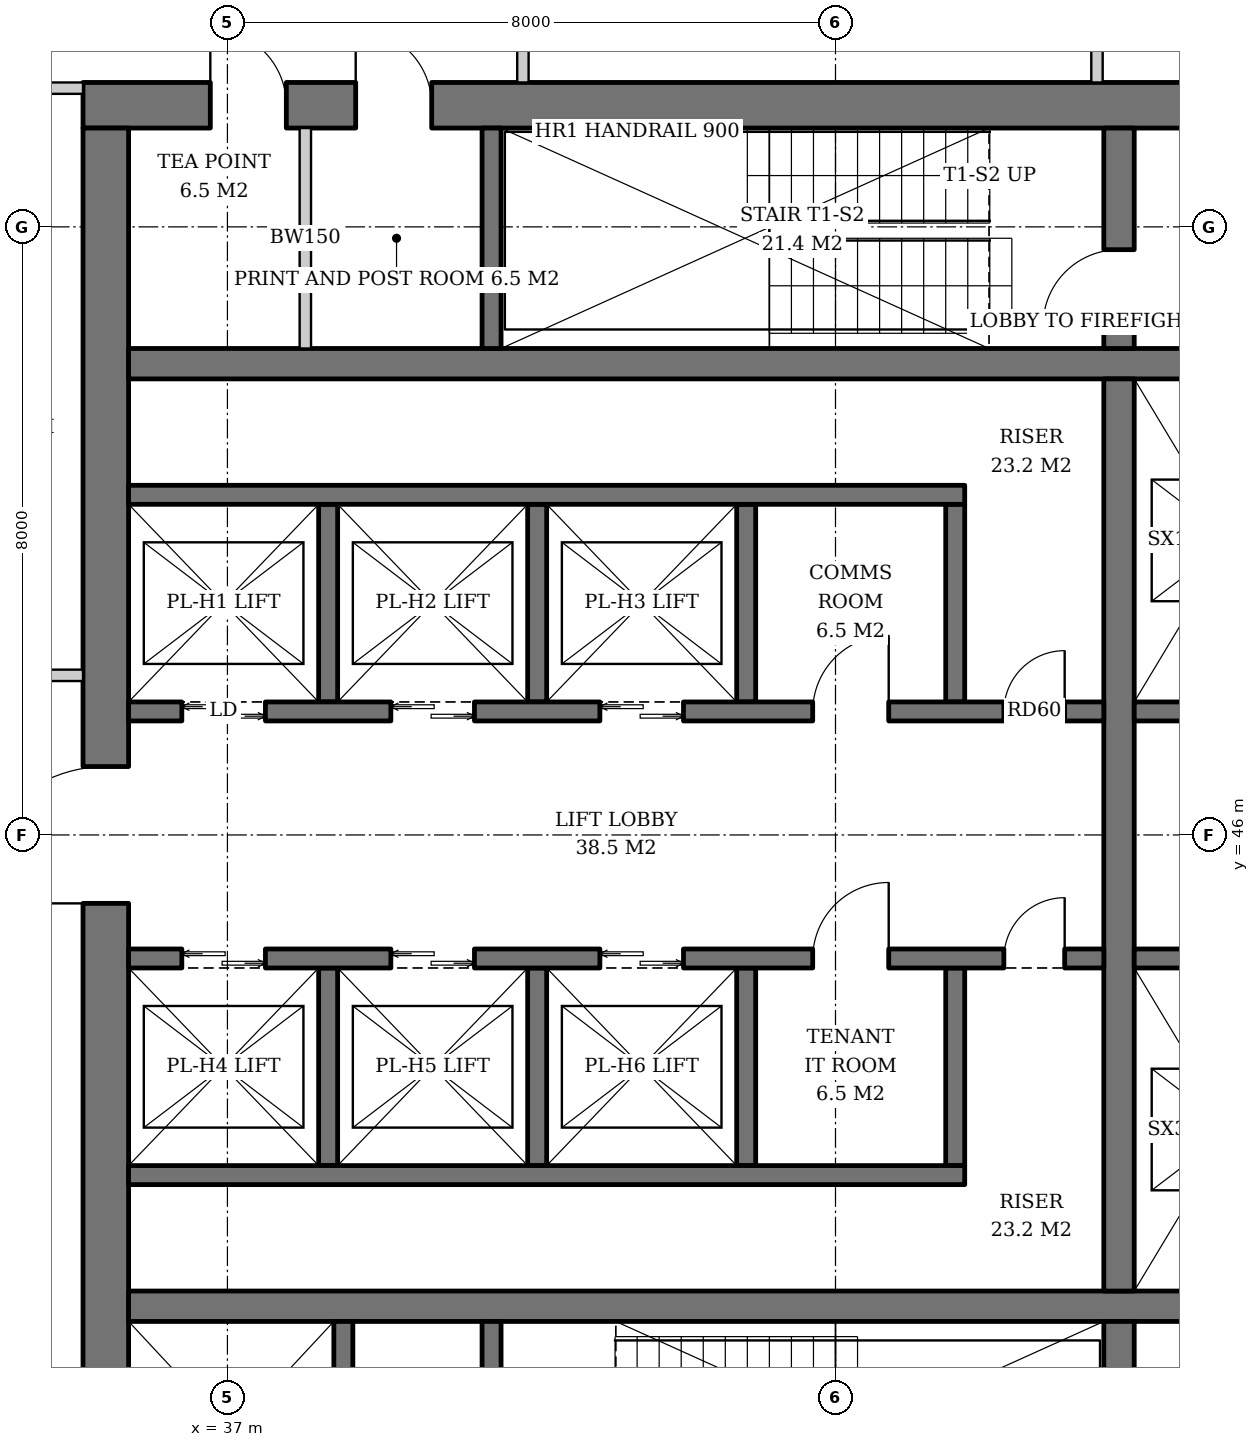
"""IFC4 building model, lengths in metres.
Left out: names, types, materials, properties, quantities, classifications, styles, units other than length and angle.
Written with IfcOpenShell. Run it as: python <this file> out.ifc"""

import sys

from ifc_helpers import new_model, si_unit, direction, frame, frame_2d, origin, place, context, subcontext, project, spatial, rectangle, extrude, element, fill, save


model = new_model("IFC4")
c1 = context("Model", 3, precision=1e-05, world=origin(), true_north=direction((0.0, 1.0)))
c2 = subcontext(c1, "Body", "Model", "MODEL_VIEW")
j1 = project(units=[si_unit("LENGTHUNIT", "METRE"), si_unit("PLANEANGLEUNIT", "RADIAN")], contexts=[c1])
p1 = place(None, origin())
s1 = spatial("IfcSite", under=j1, at=p1, CompositionType="ELEMENT")
p2 = place(p1, origin())
s2 = spatial("IfcBuilding", under=s1, at=p2, CompositionType="ELEMENT")
p3 = place(p2, frame((0.0, 0.0, 207.2)))
s3 = spatial("IfcBuildingStorey", under=s2, at=p3, CompositionType="ELEMENT", Elevation=207.2)
p4 = place(p3, frame((35.1, 55.6, 0.0), z_axis=(0.0, 0.0, 1.0), x_axis=(1.0, 0.0, 0.0)))
e1 = element("IfcWall", 1, at=p4, inside=s3, PredefinedType="SHEAR", context=c2, shape_type="SweptSolid", body=[
    extrude(rectangle(XDim=19.8, YDim=0.6, at=frame_2d((9.9, 0.0))), origin(), (0.0, 0.0, 1.0), 3.8),
])
p5 = place(p4, frame((14.54, 0.0, 0.0)))
e2 = element("IfcOpeningElement", 2, at=p5, cuts=e1, PredefinedType="OPENING", context=c2, shape_type="SweptSolid", body=[
    extrude(rectangle(XDim=1.0, YDim=2.1, at=frame_2d((0.5, 1.05))), frame((0.0, 0.31, 0.0), z_axis=(0.0, -1.0, 0.0), x_axis=(1.0, 0.0, 0.0)), (0.0, 0.0, 1.0), 0.62),
])
p6 = place(p4, frame((1.675, 0.0, 0.0)))
e3 = element("IfcOpeningElement", 3, at=p6, cuts=e1, PredefinedType="OPENING", context=c2, shape_type="SweptSolid", body=[
    extrude(rectangle(XDim=1.0, YDim=2.1, at=frame_2d((0.5, 1.05))), frame((0.0, 0.31, 0.0), z_axis=(0.0, -1.0, 0.0), x_axis=(1.0, 0.0, 0.0)), (0.0, 0.0, 1.0), 0.62),
])
p7 = place(p4, frame((3.587, 0.0, 0.0)))
e4 = element("IfcOpeningElement", 4, at=p7, cuts=e1, PredefinedType="OPENING", context=c2, shape_type="SweptSolid", body=[
    extrude(rectangle(XDim=1.0, YDim=2.1, at=frame_2d((0.5, 1.05))), frame((0.0, 0.31, 0.0), z_axis=(0.0, -1.0, 0.0), x_axis=(1.0, 0.0, 0.0)), (0.0, 0.0, 1.0), 0.62),
])
p8 = place(p3, frame((35.4, 36.7, 0.0), z_axis=(0.0, 0.0, 1.0), x_axis=(0.0, 1.0, 0.0)))
e5 = element("IfcWall", 5, at=p8, inside=s3, PredefinedType="SHEAR", context=c2, shape_type="SweptSolid", body=[
    extrude(rectangle(XDim=18.6, YDim=0.6, at=frame_2d((9.3, 0.0))), origin(), (0.0, 0.0, 1.0), 3.8),
])
p9 = place(p8, frame((8.4, 0.0, 0.0)))
e6 = element("IfcOpeningElement", 6, at=p9, cuts=e5, PredefinedType="OPENING", context=c2, shape_type="SweptSolid", body=[
    extrude(rectangle(XDim=1.8, YDim=2.4, at=frame_2d((0.9, 1.2))), frame((0.0, 0.31, 0.0), z_axis=(0.0, -1.0, 0.0), x_axis=(1.0, 0.0, 0.0)), (0.0, 0.0, 1.0), 0.62),
])
for number, where, z_axis, x_axis in (
    (7, (35.7, 39.8, 0.0), (0.0, 0.0, 1.0), (1.0, 0.0, 0.0)),
    (8, (35.7, 52.2, 0.0), (0.0, 0.0, 1.0), (1.0, 0.0, 0.0)),
):
    element("IfcWall", number, at=place(p3, frame(where, z_axis=z_axis, x_axis=x_axis)), inside=s3, PredefinedType="SHEAR", context=c2, shape_type="SweptSolid", body=[
        extrude(rectangle(XDim=18.6, YDim=0.4, at=frame_2d((9.3, 0.0))), origin(), (0.0, 0.0, 1.0), 3.8),
    ])
p10 = place(p3, frame((48.73, 36.7, 0.0), z_axis=(0.0, 0.0, 1.0), x_axis=(0.0, 1.0, 0.0)))
e9 = element("IfcWall", 9, at=p10, inside=s3, PredefinedType="SHEAR", context=c2, shape_type="SweptSolid", body=[
    extrude(rectangle(XDim=2.9, YDim=0.4, at=frame_2d((1.45, 0.0))), origin(), (0.0, 0.0, 1.0), 3.8),
])
p11 = place(p3, frame((48.73, 40.0, 0.0), z_axis=(0.0, 0.0, 1.0), x_axis=(0.0, 1.0, 0.0)))
e10 = element("IfcWall", 10, at=p11, inside=s3, PredefinedType="SHEAR", context=c2, shape_type="SweptSolid", body=[
    extrude(rectangle(XDim=12.0, YDim=0.4, at=frame_2d((6.0, 0.0))), origin(), (0.0, 0.0, 1.0), 3.8),
])
p12 = place(p3, frame((48.73, 52.4, 0.0), z_axis=(0.0, 0.0, 1.0), x_axis=(0.0, 1.0, 0.0)))
e11 = element("IfcWall", 11, at=p12, inside=s3, PredefinedType="SHEAR", context=c2, shape_type="SweptSolid", body=[
    extrude(rectangle(XDim=2.9, YDim=0.4, at=frame_2d((1.45, 0.0))), origin(), (0.0, 0.0, 1.0), 3.8),
])
p13 = place(p12, frame((0.3, 0.0, 0.0)))
e12 = element("IfcOpeningElement", 12, at=p13, cuts=e11, PredefinedType="OPENING", context=c2, shape_type="SweptSolid", body=[
    extrude(rectangle(XDim=1.0, YDim=2.1, at=frame_2d((0.5, 1.05))), frame((0.0, 0.21, 0.0), z_axis=(0.0, -1.0, 0.0), x_axis=(1.0, 0.0, 0.0)), (0.0, 0.0, 1.0), 0.42),
])
p14 = place(p3, frame((38.525, 36.7, 0.0), z_axis=(0.0, 0.0, 1.0), x_axis=(0.0, 1.0, 0.0)))
e13 = element("IfcWall", 13, at=p14, inside=s3, PredefinedType="SHEAR", context=c2, shape_type="SweptSolid", body=[
    extrude(rectangle(XDim=2.9, YDim=0.25, at=frame_2d((1.45, 0.0))), origin(), (0.0, 0.0, 1.0), 3.8),
])
p15 = place(p14, frame((0.8, 0.0, 0.0)))
e14 = element("IfcOpeningElement", 14, at=p15, cuts=e13, PredefinedType="OPENING", context=c2, shape_type="SweptSolid", body=[
    extrude(rectangle(XDim=1.3, YDim=2.2, at=frame_2d((0.65, 1.1))), frame((0.0, 0.135, 0.0), z_axis=(0.0, -1.0, 0.0), x_axis=(1.0, 0.0, 0.0)), (0.0, 0.0, 1.0), 0.27),
])
p16 = place(p3, frame((40.475, 36.7, 0.0), z_axis=(0.0, 0.0, 1.0), x_axis=(0.0, 1.0, 0.0)))
e15 = element("IfcWall", 15, at=p16, inside=s3, PredefinedType="SHEAR", context=c2, shape_type="SweptSolid", body=[
    extrude(rectangle(XDim=2.9, YDim=0.25, at=frame_2d((1.45, 0.0))), origin(), (0.0, 0.0, 1.0), 3.8),
])
p17 = place(p16, frame((0.75, 0.0, 0.0)))
e16 = element("IfcOpeningElement", 16, at=p17, cuts=e15, PredefinedType="OPENING", context=c2, shape_type="SweptSolid", body=[
    extrude(rectangle(XDim=1.2, YDim=2.1, at=frame_2d((0.6, 1.05))), frame((0.0, 0.135, 0.0), z_axis=(0.0, -1.0, 0.0), x_axis=(1.0, 0.0, 0.0)), (0.0, 0.0, 1.0), 0.27),
])
p18 = place(p3, frame((40.475, 52.4, 0.0), z_axis=(0.0, 0.0, 1.0), x_axis=(0.0, 1.0, 0.0)))
e17 = element("IfcWall", 17, at=p18, inside=s3, PredefinedType="SHEAR", context=c2, shape_type="SweptSolid", body=[
    extrude(rectangle(XDim=2.9, YDim=0.25, at=frame_2d((1.45, 0.0))), origin(), (0.0, 0.0, 1.0), 3.8),
])
for number, where, z_axis, x_axis in (
    (18, (38.325, 47.75, 0.0), (0.0, 0.0, 1.0), (0.0, 1.0, 0.0)),
    (19, (41.075, 47.75, 0.0), (0.0, 0.0, 1.0), (0.0, 1.0, 0.0)),
    (20, (43.825, 47.75, 0.0), (0.0, 0.0, 1.0), (0.0, 1.0, 0.0)),
    (21, (46.575, 47.75, 0.0), (0.0, 0.0, 1.0), (0.0, 1.0, 0.0)),
):
    element("IfcWall", number, at=place(p3, frame(where, z_axis=z_axis, x_axis=x_axis)), inside=s3, PredefinedType="SHEAR", context=c2, shape_type="SweptSolid", body=[
        extrude(rectangle(XDim=2.6, YDim=0.25, at=frame_2d((1.3, 0.0))), origin(), (0.0, 0.0, 1.0), 3.8),
    ])
p19 = place(p3, frame((35.7, 50.475, 0.0), z_axis=(0.0, 0.0, 1.0), x_axis=(1.0, 0.0, 0.0)))
e22 = element("IfcWall", 22, at=p19, inside=s3, PredefinedType="SHEAR", context=c2, shape_type="SweptSolid", body=[
    extrude(rectangle(XDim=11.0, YDim=0.25, at=frame_2d((5.5, 0.0))), origin(), (0.0, 0.0, 1.0), 3.8),
])
p20 = place(p3, frame((35.7, 47.625, 0.0), z_axis=(0.0, 0.0, 1.0), x_axis=(1.0, 0.0, 0.0)))
e23 = element("IfcWall", 23, at=p20, inside=s3, PredefinedType="SHEAR", context=c2, shape_type="SweptSolid", body=[
    extrude(rectangle(XDim=12.83, YDim=0.25, at=frame_2d((6.415, 0.0))), origin(), (0.0, 0.0, 1.0), 3.8),
])
p21 = place(p20, frame((0.7, 0.0, 0.0)))
e24 = element("IfcOpeningElement", 24, at=p21, cuts=e23, PredefinedType="OPENING", context=c2, shape_type="SweptSolid", body=[
    extrude(rectangle(XDim=1.1, YDim=2.2, at=frame_2d((0.55, 1.1))), frame((0.0, 0.135, 0.0), z_axis=(0.0, -1.0, 0.0), x_axis=(1.0, 0.0, 0.0)), (0.0, 0.0, 1.0), 0.27),
])
p22 = place(p20, frame((3.45, 0.0, 0.0)))
e25 = element("IfcOpeningElement", 25, at=p22, cuts=e23, PredefinedType="OPENING", context=c2, shape_type="SweptSolid", body=[
    extrude(rectangle(XDim=1.1, YDim=2.2, at=frame_2d((0.55, 1.1))), frame((0.0, 0.135, 0.0), z_axis=(0.0, -1.0, 0.0), x_axis=(1.0, 0.0, 0.0)), (0.0, 0.0, 1.0), 0.27),
])
p23 = place(p20, frame((6.2, 0.0, 0.0)))
e26 = element("IfcOpeningElement", 26, at=p23, cuts=e23, PredefinedType="OPENING", context=c2, shape_type="SweptSolid", body=[
    extrude(rectangle(XDim=1.1, YDim=2.2, at=frame_2d((0.55, 1.1))), frame((0.0, 0.135, 0.0), z_axis=(0.0, -1.0, 0.0), x_axis=(1.0, 0.0, 0.0)), (0.0, 0.0, 1.0), 0.27),
])
p24 = place(p20, frame((9.0, 0.0, 0.0)))
e27 = element("IfcOpeningElement", 27, at=p24, cuts=e23, PredefinedType="OPENING", context=c2, shape_type="SweptSolid", body=[
    extrude(rectangle(XDim=1.0, YDim=2.1, at=frame_2d((0.5, 1.05))), frame((0.0, 0.135, 0.0), z_axis=(0.0, -1.0, 0.0), x_axis=(1.0, 0.0, 0.0)), (0.0, 0.0, 1.0), 0.27),
])
p25 = place(p20, frame((11.515, 0.0, 0.0)))
e28 = element("IfcOpeningElement", 28, at=p25, cuts=e23, PredefinedType="OPENING", context=c2, shape_type="SweptSolid", body=[
    extrude(rectangle(XDim=0.8, YDim=2.0, at=frame_2d((0.4, 1.0))), frame((0.0, 0.135, 0.0), z_axis=(0.0, -1.0, 0.0), x_axis=(1.0, 0.0, 0.0)), (0.0, 0.0, 1.0), 0.27),
])
for number, where, z_axis, x_axis in (
    (29, (38.325, 44.25, 0.0), (0.0, 0.0, 1.0), (0.0, -1.0, 0.0)),
    (30, (41.075, 44.25, 0.0), (0.0, 0.0, 1.0), (0.0, -1.0, 0.0)),
    (31, (43.825, 44.25, 0.0), (0.0, 0.0, 1.0), (0.0, -1.0, 0.0)),
    (32, (46.575, 44.25, 0.0), (0.0, 0.0, 1.0), (0.0, -1.0, 0.0)),
):
    element("IfcWall", number, at=place(p3, frame(where, z_axis=z_axis, x_axis=x_axis)), inside=s3, PredefinedType="SHEAR", context=c2, shape_type="SweptSolid", body=[
        extrude(rectangle(XDim=2.6, YDim=0.25, at=frame_2d((1.3, 0.0))), origin(), (0.0, 0.0, 1.0), 3.8),
    ])
p26 = place(p3, frame((35.7, 41.525, 0.0), z_axis=(0.0, 0.0, 1.0), x_axis=(1.0, 0.0, 0.0)))
e33 = element("IfcWall", 33, at=p26, inside=s3, PredefinedType="SHEAR", context=c2, shape_type="SweptSolid", body=[
    extrude(rectangle(XDim=11.0, YDim=0.25, at=frame_2d((5.5, 0.0))), origin(), (0.0, 0.0, 1.0), 3.8),
])
p27 = place(p3, frame((35.7, 44.375, 0.0), z_axis=(0.0, 0.0, 1.0), x_axis=(1.0, 0.0, 0.0)))
e34 = element("IfcWall", 34, at=p27, inside=s3, PredefinedType="SHEAR", context=c2, shape_type="SweptSolid", body=[
    extrude(rectangle(XDim=12.83, YDim=0.25, at=frame_2d((6.415, 0.0))), origin(), (0.0, 0.0, 1.0), 3.8),
])
p28 = place(p27, frame((0.7, 0.0, 0.0)))
e35 = element("IfcOpeningElement", 35, at=p28, cuts=e34, PredefinedType="OPENING", context=c2, shape_type="SweptSolid", body=[
    extrude(rectangle(XDim=1.1, YDim=2.2, at=frame_2d((0.55, 1.1))), frame((0.0, 0.135, 0.0), z_axis=(0.0, -1.0, 0.0), x_axis=(1.0, 0.0, 0.0)), (0.0, 0.0, 1.0), 0.27),
])
p29 = place(p27, frame((3.45, 0.0, 0.0)))
e36 = element("IfcOpeningElement", 36, at=p29, cuts=e34, PredefinedType="OPENING", context=c2, shape_type="SweptSolid", body=[
    extrude(rectangle(XDim=1.1, YDim=2.2, at=frame_2d((0.55, 1.1))), frame((0.0, 0.135, 0.0), z_axis=(0.0, -1.0, 0.0), x_axis=(1.0, 0.0, 0.0)), (0.0, 0.0, 1.0), 0.27),
])
p30 = place(p27, frame((6.2, 0.0, 0.0)))
e37 = element("IfcOpeningElement", 37, at=p30, cuts=e34, PredefinedType="OPENING", context=c2, shape_type="SweptSolid", body=[
    extrude(rectangle(XDim=1.1, YDim=2.2, at=frame_2d((0.55, 1.1))), frame((0.0, 0.135, 0.0), z_axis=(0.0, -1.0, 0.0), x_axis=(1.0, 0.0, 0.0)), (0.0, 0.0, 1.0), 0.27),
])
p31 = place(p27, frame((9.0, 0.0, 0.0)))
e38 = element("IfcOpeningElement", 38, at=p31, cuts=e34, PredefinedType="OPENING", context=c2, shape_type="SweptSolid", body=[
    extrude(rectangle(XDim=1.0, YDim=2.1, at=frame_2d((0.5, 1.05))), frame((0.0, 0.135, 0.0), z_axis=(0.0, -1.0, 0.0), x_axis=(1.0, 0.0, 0.0)), (0.0, 0.0, 1.0), 0.27),
])
p32 = place(p27, frame((11.515, 0.0, 0.0)))
e39 = element("IfcOpeningElement", 39, at=p32, cuts=e34, PredefinedType="OPENING", context=c2, shape_type="SweptSolid", body=[
    extrude(rectangle(XDim=0.8, YDim=2.0, at=frame_2d((0.4, 1.0))), frame((0.0, 0.135, 0.0), z_axis=(0.0, -1.0, 0.0), x_axis=(1.0, 0.0, 0.0)), (0.0, 0.0, 1.0), 0.27),
])
for number, where, z_axis, x_axis in (
    (40, (48.93, 47.625, 0.0), (0.0, 0.0, 1.0), (1.0, 0.0, 0.0)),
    (41, (48.93, 44.375, 0.0), (0.0, 0.0, 1.0), (1.0, 0.0, 0.0)),
):
    element("IfcWall", number, at=place(p3, frame(where, z_axis=z_axis, x_axis=x_axis)), inside=s3, PredefinedType="SHEAR", context=c2, shape_type="SweptSolid", body=[
        extrude(rectangle(XDim=5.37, YDim=0.25, at=frame_2d((2.685, 0.0))), origin(), (0.0, 0.0, 1.0), 3.8),
    ])
p33 = place(p3, frame((38.025, 52.4, 0.0), z_axis=(0.0, 0.0, 1.0), x_axis=(0.0, 1.0, 0.0)))
e42 = element("IfcWall", 42, at=p33, inside=s3, PredefinedType="SOLIDWALL", context=c2, shape_type="SweptSolid", body=[
    extrude(rectangle(XDim=2.9, YDim=0.15, at=frame_2d((1.45, 0.0))), origin(), (0.0, 0.0, 1.0), 3.62),
])
for number, where, z_axis, x_axis in (
    (43, (48.44, 55.9, 0.0), (0.0, 0.0, 1.0), (0.0, 1.0, 0.0)),
    (44, (40.887, 55.9, 0.0), (0.0, 0.0, 1.0), (0.0, 1.0, 0.0)),
):
    element("IfcWall", number, at=place(p3, frame(where, z_axis=z_axis, x_axis=x_axis)), inside=s3, PredefinedType="PARTITIONING", context=c2, shape_type="SweptSolid", body=[
        extrude(rectangle(XDim=2.925, YDim=0.15, at=frame_2d((1.462, 0.0))), origin(), (0.0, 0.0, 1.0), 3.62),
    ])
p34 = place(p3, frame((35.1, 55.825, 0.0), z_axis=(0.0, 0.0, 1.0), x_axis=(-1.0, 0.0, 0.0)))
e45 = element("IfcWall", 45, at=p34, inside=s3, PredefinedType="PARTITIONING", context=c2, shape_type="SweptSolid", body=[
    extrude(rectangle(XDim=2.925, YDim=0.15, at=frame_2d((1.462, 0.0))), origin(), (0.0, 0.0, 1.0), 2.867),
])
p35 = place(p3, frame((35.1, 48.1, 0.0), z_axis=(0.0, 0.0, 1.0), x_axis=(-1.0, 0.0, 0.0)))
e46 = element("IfcWall", 46, at=p35, inside=s3, PredefinedType="PARTITIONING", context=c2, shape_type="SweptSolid", body=[
    extrude(rectangle(XDim=2.925, YDim=0.15, at=frame_2d((1.462, 0.0))), origin(), (0.0, 0.0, 1.0), 3.62),
])
p36 = place(p21, origin())
e47 = element("IfcDoor", 47, at=p36, inside=s3, OperationType="DOUBLE_DOOR_SLIDING", PredefinedType="DOOR", context=c2, shape_type="SweptSolid", body=[
    extrude(rectangle(XDim=1.1, YDim=2.2, at=frame_2d((0.55, 1.1))), frame((0.0, 0.025, 0.0), z_axis=(0.0, -1.0, 0.0), x_axis=(1.0, 0.0, 0.0)), (0.0, 0.0, 1.0), 0.05),
])
fill(e24, e47)
p37 = place(p22, origin())
e48 = element("IfcDoor", 48, at=p37, inside=s3, OperationType="DOUBLE_DOOR_SLIDING", PredefinedType="DOOR", context=c2, shape_type="SweptSolid", body=[
    extrude(rectangle(XDim=1.1, YDim=2.2, at=frame_2d((0.55, 1.1))), frame((0.0, 0.025, 0.0), z_axis=(0.0, -1.0, 0.0), x_axis=(1.0, 0.0, 0.0)), (0.0, 0.0, 1.0), 0.05),
])
fill(e25, e48)
p38 = place(p23, origin())
e49 = element("IfcDoor", 49, at=p38, inside=s3, OperationType="DOUBLE_DOOR_SLIDING", PredefinedType="DOOR", context=c2, shape_type="SweptSolid", body=[
    extrude(rectangle(XDim=1.1, YDim=2.2, at=frame_2d((0.55, 1.1))), frame((0.0, 0.025, 0.0), z_axis=(0.0, -1.0, 0.0), x_axis=(1.0, 0.0, 0.0)), (0.0, 0.0, 1.0), 0.05),
])
fill(e26, e49)
p39 = place(p24, origin())
e50 = element("IfcDoor", 50, at=p39, inside=s3, OperationType="SINGLE_SWING_RIGHT", PredefinedType="DOOR", context=c2, shape_type="SweptSolid", body=[
    extrude(rectangle(XDim=1.0, YDim=2.1, at=frame_2d((0.5, 1.05))), frame((0.0, 0.025, 0.0), z_axis=(0.0, -1.0, 0.0), x_axis=(1.0, 0.0, 0.0)), (0.0, 0.0, 1.0), 0.05),
])
fill(e27, e50)
p40 = place(p25, origin())
e51 = element("IfcDoor", 51, at=p40, inside=s3, OperationType="SINGLE_SWING_RIGHT", PredefinedType="DOOR", context=c2, shape_type="SweptSolid", body=[
    extrude(rectangle(XDim=0.8, YDim=2.0, at=frame_2d((0.4, 1.0))), frame((0.0, 0.025, 0.0), z_axis=(0.0, -1.0, 0.0), x_axis=(1.0, 0.0, 0.0)), (0.0, 0.0, 1.0), 0.05),
])
fill(e28, e51)
p41 = place(p28, origin())
e52 = element("IfcDoor", 52, at=p41, inside=s3, OperationType="DOUBLE_DOOR_SLIDING", PredefinedType="DOOR", context=c2, shape_type="SweptSolid", body=[
    extrude(rectangle(XDim=1.1, YDim=2.2, at=frame_2d((0.55, 1.1))), frame((0.0, 0.025, 0.0), z_axis=(0.0, -1.0, 0.0), x_axis=(1.0, 0.0, 0.0)), (0.0, 0.0, 1.0), 0.05),
])
fill(e35, e52)
p42 = place(p29, origin())
e53 = element("IfcDoor", 53, at=p42, inside=s3, OperationType="DOUBLE_DOOR_SLIDING", PredefinedType="DOOR", context=c2, shape_type="SweptSolid", body=[
    extrude(rectangle(XDim=1.1, YDim=2.2, at=frame_2d((0.55, 1.1))), frame((0.0, 0.025, 0.0), z_axis=(0.0, -1.0, 0.0), x_axis=(1.0, 0.0, 0.0)), (0.0, 0.0, 1.0), 0.05),
])
fill(e36, e53)
p43 = place(p30, origin())
e54 = element("IfcDoor", 54, at=p43, inside=s3, OperationType="DOUBLE_DOOR_SLIDING", PredefinedType="DOOR", context=c2, shape_type="SweptSolid", body=[
    extrude(rectangle(XDim=1.1, YDim=2.2, at=frame_2d((0.55, 1.1))), frame((0.0, 0.025, 0.0), z_axis=(0.0, -1.0, 0.0), x_axis=(1.0, 0.0, 0.0)), (0.0, 0.0, 1.0), 0.05),
])
fill(e37, e54)
p44 = place(p31, origin())
e55 = element("IfcDoor", 55, at=p44, inside=s3, OperationType="SINGLE_SWING_RIGHT", PredefinedType="DOOR", context=c2, shape_type="SweptSolid", body=[
    extrude(rectangle(XDim=1.0, YDim=2.1, at=frame_2d((0.5, 1.05))), frame((0.0, 0.025, 0.0), z_axis=(0.0, -1.0, 0.0), x_axis=(1.0, 0.0, 0.0)), (0.0, 0.0, 1.0), 0.05),
])
fill(e38, e55)
p45 = place(p32, origin())
e56 = element("IfcDoor", 56, at=p45, inside=s3, OperationType="SINGLE_SWING_RIGHT", PredefinedType="DOOR", context=c2, shape_type="SweptSolid", body=[
    extrude(rectangle(XDim=0.8, YDim=2.0, at=frame_2d((0.4, 1.0))), frame((0.0, 0.025, 0.0), z_axis=(0.0, -1.0, 0.0), x_axis=(1.0, 0.0, 0.0)), (0.0, 0.0, 1.0), 0.05),
])
fill(e39, e56)
p46 = place(p13, origin())
e57 = element("IfcDoor", 57, at=p46, inside=s3, OperationType="SINGLE_SWING_LEFT", PredefinedType="DOOR", context=c2, shape_type="SweptSolid", body=[
    extrude(rectangle(XDim=1.0, YDim=2.1, at=frame_2d((0.5, 1.05))), frame((0.0, 0.025, 0.0), z_axis=(0.0, -1.0, 0.0), x_axis=(1.0, 0.0, 0.0)), (0.0, 0.0, 1.0), 0.05),
])
fill(e12, e57)
p47 = place(p9, origin())
e58 = element("IfcDoor", 58, at=p47, inside=s3, OperationType="DOUBLE_DOOR_SINGLE_SWING", PredefinedType="DOOR", context=c2, shape_type="SweptSolid", body=[
    extrude(rectangle(XDim=1.8, YDim=2.4, at=frame_2d((0.9, 1.2))), frame((0.0, 0.025, 0.0), z_axis=(0.0, -1.0, 0.0), x_axis=(1.0, 0.0, 0.0)), (0.0, 0.0, 1.0), 0.05),
])
fill(e6, e58)
p48 = place(p6, origin())
e59 = element("IfcDoor", 59, at=p48, inside=s3, OperationType="SINGLE_SWING_LEFT", PredefinedType="DOOR", context=c2, shape_type="SweptSolid", body=[
    extrude(rectangle(XDim=1.0, YDim=2.1, at=frame_2d((0.5, 1.05))), frame((0.0, -0.24, 0.0), z_axis=(0.0, -1.0, 0.0), x_axis=(1.0, 0.0, 0.0)), (0.0, 0.0, 1.0), 0.05),
])
fill(e3, e59)
p49 = place(p7, origin())
e60 = element("IfcDoor", 60, at=p49, inside=s3, OperationType="SINGLE_SWING_LEFT", PredefinedType="DOOR", context=c2, shape_type="SweptSolid", body=[
    extrude(rectangle(XDim=1.0, YDim=2.1, at=frame_2d((0.5, 1.05))), frame((0.0, -0.24, 0.0), z_axis=(0.0, -1.0, 0.0), x_axis=(1.0, 0.0, 0.0)), (0.0, 0.0, 1.0), 0.05),
])
fill(e4, e60)
save(model, sys.argv[1])
